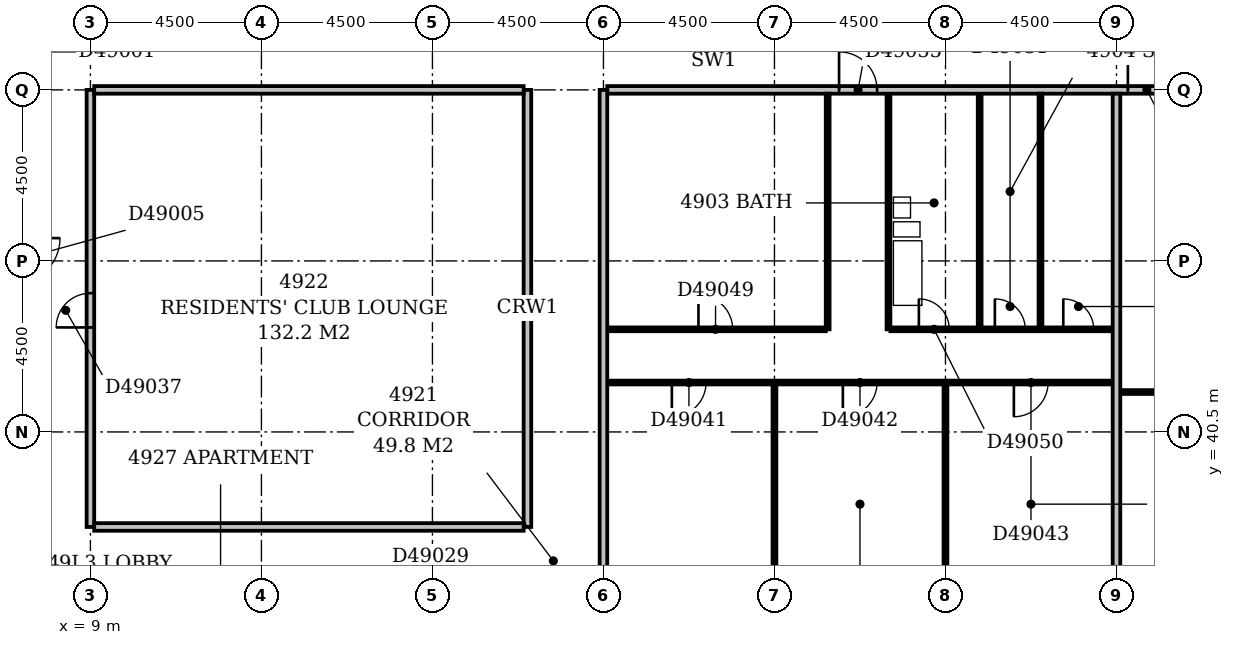
"""IFC4 building model, lengths in metres.
Left out: names, types, materials, properties, quantities, classifications, styles, units other than length and angle.
Written with IfcOpenShell. Run it as: python <this file> out.ifc"""

import sys

from ifc_helpers import new_model, si_unit, direction, frame, frame_2d, origin, place, context, subcontext, project, spatial, rectangle, extrude, element, fill, save


model = new_model("IFC4")
c1 = context("Model", 3, precision=1e-05, world=origin(), true_north=direction((0.0, 1.0)))
c2 = subcontext(c1, "Body", "Model", "MODEL_VIEW")
j1 = project(units=[si_unit("LENGTHUNIT", "METRE"), si_unit("PLANEANGLEUNIT", "RADIAN")], contexts=[c1])
p1 = place(None, origin())
s1 = spatial("IfcSite", under=j1, at=p1, CompositionType="ELEMENT")
p2 = place(p1, origin())
s2 = spatial("IfcBuilding", under=s1, at=p2, CompositionType="ELEMENT")
p3 = place(p2, frame((0.0, 0.0, 193.4)))
s3 = spatial("IfcBuildingStorey", under=s2, at=p3, CompositionType="ELEMENT", Elevation=193.4)
p4 = place(p3, frame((22.5, 36.45, 0.0), z_axis=(0.0, 0.0, 1.0), x_axis=(0.0, 1.0, 0.0)))
e1 = element("IfcWall", 1, at=p4, inside=s3, PredefinedType="PARTITIONING", context=c2, shape_type="SweptSolid", body=[
    extrude(rectangle(XDim=13.05, YDim=0.2, at=frame_2d((6.525, 0.0))), origin(), (0.0, 0.0, 1.0), 3.3),
])
p5 = place(p3, frame((27.0, 36.45, 0.0), z_axis=(0.0, 0.0, 1.0), x_axis=(0.0, 1.0, 0.0)))
e2 = element("IfcWall", 2, at=p5, inside=s3, PredefinedType="PARTITIONING", context=c2, shape_type="SweptSolid", body=[
    extrude(rectangle(XDim=5.3, YDim=0.1, at=frame_2d((2.65, 0.0))), origin(), (0.0, 0.0, 1.0), 2.4),
])
p6 = place(p3, frame((31.5, 36.45, 0.0), z_axis=(0.0, 0.0, 1.0), x_axis=(0.0, 1.0, 0.0)))
e3 = element("IfcWall", 3, at=p6, inside=s3, PredefinedType="PARTITIONING", context=c2, shape_type="SweptSolid", body=[
    extrude(rectangle(XDim=5.3, YDim=0.1, at=frame_2d((2.65, 0.0))), origin(), (0.0, 0.0, 1.0), 3.3),
])
p7 = place(p3, frame((36.0, 36.45, 0.0), z_axis=(0.0, 0.0, 1.0), x_axis=(0.0, 1.0, 0.0)))
e4 = element("IfcWall", 4, at=p7, inside=s3, PredefinedType="PARTITIONING", context=c2, shape_type="SweptSolid", body=[
    extrude(rectangle(XDim=12.95, YDim=0.2, at=frame_2d((6.475, 0.0))), origin(), (0.0, 0.0, 1.0), 2.4),
])
p8 = place(p3, frame((9.0, 38.0, 0.0), z_axis=(0.0, 0.0, 1.0), x_axis=(0.0, 1.0, 0.0)))
e5 = element("IfcWall", 5, at=p8, inside=s3, PredefinedType="PARTITIONING", context=c2, shape_type="SweptSolid", body=[
    extrude(rectangle(XDim=11.5, YDim=0.2, at=frame_2d((5.75, 0.0))), origin(), (0.0, 0.0, 1.0), 3.3),
])
p9 = place(p8, frame((5.25, 0.0, 0.0)))
e6 = element("IfcOpeningElement", 6, at=p9, cuts=e5, PredefinedType="OPENING", context=c2, shape_type="SweptSolid", body=[
    extrude(rectangle(XDim=0.9, YDim=2.1, at=frame_2d((0.45, 1.05))), frame((0.0, 0.112, 0.0), z_axis=(0.0, -1.0, 0.0), x_axis=(1.0, 0.0, 0.0)), (0.0, 0.0, 1.0), 0.224),
])
p10 = place(p3, frame((9.1, 38.0, 0.0), z_axis=(0.0, 0.0, 1.0), x_axis=(1.0, 0.0, 0.0)))
e7 = element("IfcWall", 7, at=p10, inside=s3, PredefinedType="PARTITIONING", context=c2, shape_type="SweptSolid", body=[
    extrude(rectangle(XDim=11.3, YDim=0.2, at=frame_2d((5.65, 0.0))), origin(), (0.0, 0.0, 1.0), 3.3),
])
p11 = place(p3, frame((20.5, 38.0, 0.0), z_axis=(0.0, 0.0, 1.0), x_axis=(0.0, 1.0, 0.0)))
e8 = element("IfcWall", 8, at=p11, inside=s3, PredefinedType="PARTITIONING", context=c2, shape_type="SweptSolid", body=[
    extrude(rectangle(XDim=11.5, YDim=0.2, at=frame_2d((5.75, 0.0))), origin(), (0.0, 0.0, 1.0), 3.3),
])
p12 = place(p3, frame((36.1, 41.55, 0.0), z_axis=(0.0, 0.0, 1.0), x_axis=(1.0, 0.0, 0.0)))
e9 = element("IfcWall", 9, at=p12, inside=s3, PredefinedType="PARTITIONING", context=c2, shape_type="SweptSolid", body=[
    extrude(rectangle(XDim=13.3, YDim=0.1, at=frame_2d((6.65, 0.0))), origin(), (0.0, 0.0, 1.0), 3.3),
])
p13 = place(p12, frame((3.9, 0.0, 0.0)))
e10 = element("IfcOpeningElement", 10, at=p13, cuts=e9, PredefinedType="OPENING", context=c2, shape_type="SweptSolid", body=[
    extrude(rectangle(XDim=0.9, YDim=2.1, at=frame_2d((0.45, 1.05))), frame((0.0, 0.062, 0.0), z_axis=(0.0, -1.0, 0.0), x_axis=(1.0, 0.0, 0.0)), (0.0, 0.0, 1.0), 0.124),
])
p14 = place(p12, frame((10.7, 0.0, 0.0)))
e11 = element("IfcOpeningElement", 11, at=p14, cuts=e9, PredefinedType="OPENING", context=c2, shape_type="SweptSolid", body=[
    extrude(rectangle(XDim=0.9, YDim=2.1, at=frame_2d((0.45, 1.05))), frame((0.0, 0.062, 0.0), z_axis=(0.0, -1.0, 0.0), x_axis=(1.0, 0.0, 0.0)), (0.0, 0.0, 1.0), 0.124),
])
p15 = place(p3, frame((22.6, 41.8, 0.0), z_axis=(0.0, 0.0, 1.0), x_axis=(1.0, 0.0, 0.0)))
e12 = element("IfcWall", 12, at=p15, inside=s3, PredefinedType="PARTITIONING", context=c2, shape_type="SweptSolid", body=[
    extrude(rectangle(XDim=13.3, YDim=0.1, at=frame_2d((6.65, 0.0))), origin(), (0.0, 0.0, 1.0), 3.3),
])
p16 = place(p15, frame((1.7, 0.0, 0.0)))
e13 = element("IfcOpeningElement", 13, at=p16, cuts=e12, PredefinedType="OPENING", context=c2, shape_type="SweptSolid", body=[
    extrude(rectangle(XDim=0.9, YDim=2.1, at=frame_2d((0.45, 1.05))), frame((0.0, 0.062, 0.0), z_axis=(0.0, -1.0, 0.0), x_axis=(1.0, 0.0, 0.0)), (0.0, 0.0, 1.0), 0.124),
])
p17 = place(p15, frame((6.2, 0.0, 0.0)))
e14 = element("IfcOpeningElement", 14, at=p17, cuts=e12, PredefinedType="OPENING", context=c2, shape_type="SweptSolid", body=[
    extrude(rectangle(XDim=0.9, YDim=2.1, at=frame_2d((0.45, 1.05))), frame((0.0, 0.062, 0.0), z_axis=(0.0, -1.0, 0.0), x_axis=(1.0, 0.0, 0.0)), (0.0, 0.0, 1.0), 0.124),
])
p18 = place(p15, frame((10.7, 0.0, 0.0)))
e15 = element("IfcOpeningElement", 15, at=p18, cuts=e12, PredefinedType="OPENING", context=c2, shape_type="SweptSolid", body=[
    extrude(rectangle(XDim=0.9, YDim=2.1, at=frame_2d((0.45, 1.05))), frame((0.0, 0.062, 0.0), z_axis=(0.0, -1.0, 0.0), x_axis=(1.0, 0.0, 0.0)), (0.0, 0.0, 1.0), 0.124),
])
p19 = place(p3, frame((22.6, 43.2, 0.0), z_axis=(0.0, 0.0, 1.0), x_axis=(1.0, 0.0, 0.0)))
e16 = element("IfcWall", 16, at=p19, inside=s3, PredefinedType="PARTITIONING", context=c2, shape_type="SweptSolid", body=[
    extrude(rectangle(XDim=5.75, YDim=0.1, at=frame_2d((2.875, 0.0))), origin(), (0.0, 0.0, 1.0), 3.3),
])
p20 = place(p19, frame((2.4, 0.0, 0.0)))
e17 = element("IfcOpeningElement", 17, at=p20, cuts=e16, PredefinedType="OPENING", context=c2, shape_type="SweptSolid", body=[
    extrude(rectangle(XDim=0.9, YDim=2.1, at=frame_2d((0.45, 1.05))), frame((0.0, 0.062, 0.0), z_axis=(0.0, -1.0, 0.0), x_axis=(1.0, 0.0, 0.0)), (0.0, 0.0, 1.0), 0.124),
])
p21 = place(p3, frame((28.4, 43.2, 0.0), z_axis=(0.0, 0.0, 1.0), x_axis=(0.0, 1.0, 0.0)))
e18 = element("IfcWall", 18, at=p21, inside=s3, PredefinedType="PARTITIONING", context=c2, shape_type="SweptSolid", body=[
    extrude(rectangle(XDim=6.2, YDim=0.1, at=frame_2d((3.1, 0.0))), origin(), (0.0, 0.0, 1.0), 3.3),
])
p22 = place(p3, frame((30.0, 43.2, 0.0), z_axis=(0.0, 0.0, 1.0), x_axis=(0.0, 1.0, 0.0)))
e19 = element("IfcWall", 19, at=p22, inside=s3, PredefinedType="PLUMBINGWALL", context=c2, shape_type="SweptSolid", body=[
    extrude(rectangle(XDim=6.2, YDim=0.1, at=frame_2d((3.1, 0.0))), origin(), (0.0, 0.0, 1.0), 3.3),
])
p23 = place(p3, frame((30.05, 43.2, 0.0), z_axis=(0.0, 0.0, 1.0), x_axis=(1.0, 0.0, 0.0)))
e20 = element("IfcWall", 20, at=p23, inside=s3, PredefinedType="PARTITIONING", context=c2, shape_type="SweptSolid", body=[
    extrude(rectangle(XDim=5.85, YDim=0.1, at=frame_2d((2.925, 0.0))), origin(), (0.0, 0.0, 1.0), 3.3),
])
p24 = place(p23, frame((0.75, 0.0, 0.0)))
e21 = element("IfcOpeningElement", 21, at=p24, cuts=e20, PredefinedType="OPENING", context=c2, shape_type="SweptSolid", body=[
    extrude(rectangle(XDim=0.8, YDim=2.1, at=frame_2d((0.4, 1.05))), frame((0.0, 0.062, 0.0), z_axis=(0.0, -1.0, 0.0), x_axis=(1.0, 0.0, 0.0)), (0.0, 0.0, 1.0), 0.124),
])
p25 = place(p23, frame((2.75, 0.0, 0.0)))
e22 = element("IfcOpeningElement", 22, at=p25, cuts=e20, PredefinedType="OPENING", context=c2, shape_type="SweptSolid", body=[
    extrude(rectangle(XDim=0.8, YDim=2.1, at=frame_2d((0.4, 1.05))), frame((0.0, 0.062, 0.0), z_axis=(0.0, -1.0, 0.0), x_axis=(1.0, 0.0, 0.0)), (0.0, 0.0, 1.0), 0.124),
])
p26 = place(p23, frame((4.55, 0.0, 0.0)))
e23 = element("IfcOpeningElement", 23, at=p26, cuts=e20, PredefinedType="OPENING", context=c2, shape_type="SweptSolid", body=[
    extrude(rectangle(XDim=0.8, YDim=2.1, at=frame_2d((0.4, 1.05))), frame((0.0, 0.062, 0.0), z_axis=(0.0, -1.0, 0.0), x_axis=(1.0, 0.0, 0.0)), (0.0, 0.0, 1.0), 0.124),
])
p27 = place(p3, frame((32.4, 43.25, 0.0), z_axis=(0.0, 0.0, 1.0), x_axis=(0.0, 1.0, 0.0)))
e24 = element("IfcWall", 24, at=p27, inside=s3, PredefinedType="PLUMBINGWALL", context=c2, shape_type="SweptSolid", body=[
    extrude(rectangle(XDim=6.15, YDim=0.1, at=frame_2d((3.075, 0.0))), origin(), (0.0, 0.0, 1.0), 3.3),
])
p28 = place(p3, frame((34.0, 43.25, 0.0), z_axis=(0.0, 0.0, 1.0), x_axis=(0.0, 1.0, 0.0)))
e25 = element("IfcWall", 25, at=p28, inside=s3, PredefinedType="PARTITIONING", context=c2, shape_type="SweptSolid", body=[
    extrude(rectangle(XDim=6.15, YDim=0.1, at=frame_2d((3.075, 0.0))), origin(), (0.0, 0.0, 1.0), 3.3),
])
p29 = place(p3, frame((9.1, 49.5, 0.0), z_axis=(0.0, 0.0, 1.0), x_axis=(1.0, 0.0, 0.0)))
e26 = element("IfcWall", 26, at=p29, inside=s3, PredefinedType="PARTITIONING", context=c2, shape_type="SweptSolid", body=[
    extrude(rectangle(XDim=11.3, YDim=0.2, at=frame_2d((5.65, 0.0))), origin(), (0.0, 0.0, 1.0), 3.3),
])
p30 = place(p3, frame((22.6, 49.5, 0.0), z_axis=(0.0, 0.0, 1.0), x_axis=(1.0, 0.0, 0.0)))
e27 = element("IfcWall", 27, at=p30, inside=s3, PredefinedType="PARTITIONING", context=c2, shape_type="SweptSolid", body=[
    extrude(rectangle(XDim=30.95, YDim=0.2, at=frame_2d((15.475, 0.0))), origin(), (0.0, 0.0, 1.0), 3.3),
])
p31 = place(p30, frame((6.1, 0.0, 0.0)))
e28 = element("IfcOpeningElement", 28, at=p31, cuts=e27, PredefinedType="OPENING", context=c2, shape_type="SweptSolid", body=[
    extrude(rectangle(XDim=1.0, YDim=2.1, at=frame_2d((0.5, 1.05))), frame((0.0, 0.112, 0.0), z_axis=(0.0, -1.0, 0.0), x_axis=(1.0, 0.0, 0.0)), (0.0, 0.0, 1.0), 0.224),
])
p32 = place(p30, frame((13.7, 0.0, 0.0)))
e29 = element("IfcOpeningElement", 29, at=p32, cuts=e27, PredefinedType="OPENING", context=c2, shape_type="SweptSolid", body=[
    extrude(rectangle(XDim=1.0, YDim=2.1, at=frame_2d((0.5, 1.05))), frame((0.0, 0.112, 0.0), z_axis=(0.0, -1.0, 0.0), x_axis=(1.0, 0.0, 0.0)), (0.0, 0.0, 1.0), 0.224),
])
p33 = place(p30, frame((27.15, 0.0, 0.0)))
e30 = element("IfcOpeningElement", 30, at=p33, cuts=e27, PredefinedType="OPENING", context=c2, shape_type="SweptSolid", body=[
    extrude(rectangle(XDim=1.0, YDim=2.1, at=frame_2d((0.5, 1.05))), frame((0.0, 0.112, 0.0), z_axis=(0.0, -1.0, 0.0), x_axis=(1.0, 0.0, 0.0)), (0.0, 0.0, 1.0), 0.224),
])
p34 = place(p9, origin())
e31 = element("IfcDoor", 31, at=p34, inside=s3, OperationType="SINGLE_SWING_LEFT", PredefinedType="DOOR", context=c2, shape_type="SweptSolid", body=[
    extrude(rectangle(XDim=0.9, YDim=2.1, at=frame_2d((0.45, 1.05))), frame((0.0, 0.025, 0.0), z_axis=(0.0, -1.0, 0.0), x_axis=(1.0, 0.0, 0.0)), (0.0, 0.0, 1.0), 0.05),
])
fill(e6, e31)
p35 = place(p16, frame((0.9, 0.0, 0.0), z_axis=(0.0, 0.0, 1.0), x_axis=(-1.0, 0.0, 0.0)))
e32 = element("IfcDoor", 32, at=p35, inside=s3, OperationType="SINGLE_SWING_RIGHT", PredefinedType="DOOR", context=c2, shape_type="SweptSolid", body=[
    extrude(rectangle(XDim=0.9, YDim=2.1, at=frame_2d((0.45, 1.05))), frame((0.0, 0.025, 0.0), z_axis=(0.0, -1.0, 0.0), x_axis=(1.0, 0.0, 0.0)), (0.0, 0.0, 1.0), 0.05),
])
fill(e13, e32)
p36 = place(p17, frame((0.9, 0.0, 0.0), z_axis=(0.0, 0.0, 1.0), x_axis=(-1.0, 0.0, 0.0)))
e33 = element("IfcDoor", 33, at=p36, inside=s3, OperationType="SINGLE_SWING_RIGHT", PredefinedType="DOOR", context=c2, shape_type="SweptSolid", body=[
    extrude(rectangle(XDim=0.9, YDim=2.1, at=frame_2d((0.45, 1.05))), frame((0.0, 0.025, 0.0), z_axis=(0.0, -1.0, 0.0), x_axis=(1.0, 0.0, 0.0)), (0.0, 0.0, 1.0), 0.05),
])
fill(e14, e33)
p37 = place(p18, frame((0.9, 0.0, 0.0), z_axis=(0.0, 0.0, 1.0), x_axis=(-1.0, 0.0, 0.0)))
e34 = element("IfcDoor", 34, at=p37, inside=s3, OperationType="SINGLE_SWING_RIGHT", PredefinedType="DOOR", context=c2, shape_type="SweptSolid", body=[
    extrude(rectangle(XDim=0.9, YDim=2.1, at=frame_2d((0.45, 1.05))), frame((0.0, 0.025, 0.0), z_axis=(0.0, -1.0, 0.0), x_axis=(1.0, 0.0, 0.0)), (0.0, 0.0, 1.0), 0.05),
])
fill(e15, e34)
p38 = place(p20, origin())
e35 = element("IfcDoor", 35, at=p38, inside=s3, OperationType="SINGLE_SWING_LEFT", PredefinedType="DOOR", context=c2, shape_type="SweptSolid", body=[
    extrude(rectangle(XDim=0.9, YDim=2.1, at=frame_2d((0.45, 1.05))), frame((0.0, 0.025, 0.0), z_axis=(0.0, -1.0, 0.0), x_axis=(1.0, 0.0, 0.0)), (0.0, 0.0, 1.0), 0.05),
])
fill(e17, e35)
p39 = place(p24, origin())
e36 = element("IfcDoor", 36, at=p39, inside=s3, OperationType="SINGLE_SWING_LEFT", PredefinedType="DOOR", context=c2, shape_type="SweptSolid", body=[
    extrude(rectangle(XDim=0.8, YDim=2.1, at=frame_2d((0.4, 1.05))), frame((0.0, 0.025, 0.0), z_axis=(0.0, -1.0, 0.0), x_axis=(1.0, 0.0, 0.0)), (0.0, 0.0, 1.0), 0.05),
])
fill(e21, e36)
p40 = place(p25, origin())
e37 = element("IfcDoor", 37, at=p40, inside=s3, OperationType="SINGLE_SWING_LEFT", PredefinedType="DOOR", context=c2, shape_type="SweptSolid", body=[
    extrude(rectangle(XDim=0.8, YDim=2.1, at=frame_2d((0.4, 1.05))), frame((0.0, 0.025, 0.0), z_axis=(0.0, -1.0, 0.0), x_axis=(1.0, 0.0, 0.0)), (0.0, 0.0, 1.0), 0.05),
])
fill(e22, e37)
p41 = place(p26, origin())
e38 = element("IfcDoor", 38, at=p41, inside=s3, OperationType="SINGLE_SWING_LEFT", PredefinedType="DOOR", context=c2, shape_type="SweptSolid", body=[
    extrude(rectangle(XDim=0.8, YDim=2.1, at=frame_2d((0.4, 1.05))), frame((0.0, 0.025, 0.0), z_axis=(0.0, -1.0, 0.0), x_axis=(1.0, 0.0, 0.0)), (0.0, 0.0, 1.0), 0.05),
])
fill(e23, e38)
p42 = place(p31, origin())
e39 = element("IfcDoor", 39, at=p42, inside=s3, OperationType="SINGLE_SWING_LEFT", PredefinedType="DOOR", context=c2, shape_type="SweptSolid", body=[
    extrude(rectangle(XDim=1.0, YDim=2.1, at=frame_2d((0.5, 1.05))), frame((0.0, 0.025, 0.0), z_axis=(0.0, -1.0, 0.0), x_axis=(1.0, 0.0, 0.0)), (0.0, 0.0, 1.0), 0.05),
])
fill(e28, e39)
p43 = place(p32, origin())
e40 = element("IfcDoor", 40, at=p43, inside=s3, OperationType="SINGLE_SWING_LEFT", PredefinedType="DOOR", context=c2, shape_type="SweptSolid", body=[
    extrude(rectangle(XDim=1.0, YDim=2.1, at=frame_2d((0.5, 1.05))), frame((0.0, 0.025, 0.0), z_axis=(0.0, -1.0, 0.0), x_axis=(1.0, 0.0, 0.0)), (0.0, 0.0, 1.0), 0.05),
])
fill(e29, e40)
save(model, sys.argv[1])
